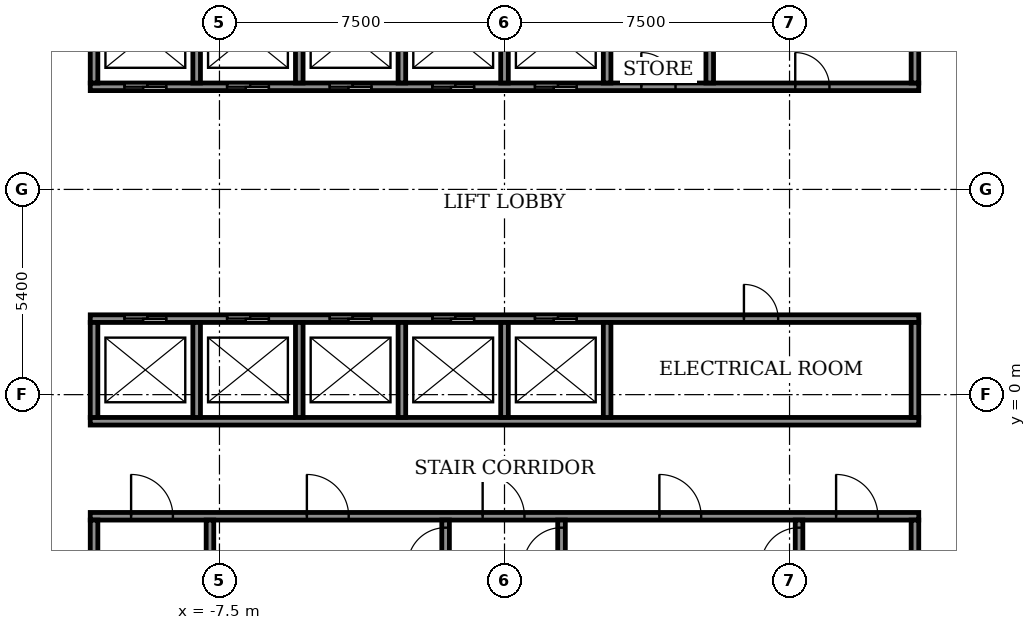
"""IFC4 building model, lengths in metres.
Left out: names, types, materials, properties, quantities, classifications, styles, units other than length and angle.
Written with IfcOpenShell. Run it as: python <this file> out.ifc"""

import sys

from ifc_helpers import new_model, si_unit, direction, frame, frame_2d, origin, place, context, subcontext, project, spatial, rectangle, extrude, element, fill, save


model = new_model("IFC4")
c1 = context("Model", 3, precision=1e-05, world=origin(), true_north=direction((0.0, 1.0)))
c2 = subcontext(c1, "Body", "Model", "MODEL_VIEW")
j1 = project(units=[si_unit("LENGTHUNIT", "METRE"), si_unit("PLANEANGLEUNIT", "RADIAN")], contexts=[c1])
p1 = place(None, origin())
s1 = spatial("IfcSite", under=j1, at=p1, CompositionType="ELEMENT")
p2 = place(p1, origin())
s2 = spatial("IfcBuilding", under=s1, at=p2, CompositionType="ELEMENT")
p3 = place(p2, origin())
s3 = spatial("IfcBuildingStorey", under=s2, at=p3, CompositionType="ELEMENT", Elevation=0.0)
p4 = place(p3, frame((-10.9, -3.2, 0.0), z_axis=(0.0, 0.0, 1.0), x_axis=(1.0, 0.0, 0.0)))
e1 = element("IfcWall", 1, at=p4, inside=s3, PredefinedType="SHEAR", context=c2, shape_type="SweptSolid", body=[
    extrude(rectangle(XDim=21.8, YDim=0.2, at=frame_2d((10.9, 0.0))), origin(), (0.0, 0.0, 1.0), 5.45),
])
p5 = place(p4, frame((1.075, 0.0, 0.0)))
e2 = element("IfcOpeningElement", 2, at=p5, cuts=e1, PredefinedType="OPENING", context=c2, shape_type="SweptSolid", body=[
    extrude(rectangle(XDim=1.1, YDim=2.1, at=frame_2d((0.55, 1.05))), frame((0.0, 0.11, 0.0), z_axis=(0.0, -1.0, 0.0), x_axis=(1.0, 0.0, 0.0)), (0.0, 0.0, 1.0), 0.22),
])
p6 = place(p4, frame((10.325, 0.0, 0.0)))
e3 = element("IfcOpeningElement", 3, at=p6, cuts=e1, PredefinedType="OPENING", context=c2, shape_type="SweptSolid", body=[
    extrude(rectangle(XDim=1.1, YDim=2.1, at=frame_2d((0.55, 1.05))), frame((0.0, 0.11, 0.0), z_axis=(0.0, -1.0, 0.0), x_axis=(1.0, 0.0, 0.0)), (0.0, 0.0, 1.0), 0.22),
])
p7 = place(p4, frame((19.625, 0.0, 0.0)))
e4 = element("IfcOpeningElement", 4, at=p7, cuts=e1, PredefinedType="OPENING", context=c2, shape_type="SweptSolid", body=[
    extrude(rectangle(XDim=1.1, YDim=2.1, at=frame_2d((0.55, 1.05))), frame((0.0, 0.11, 0.0), z_axis=(0.0, -1.0, 0.0), x_axis=(1.0, 0.0, 0.0)), (0.0, 0.0, 1.0), 0.22),
])
p8 = place(p4, frame((5.7, 0.0, 0.0)))
e5 = element("IfcOpeningElement", 5, at=p8, cuts=e1, PredefinedType="OPENING", context=c2, shape_type="SweptSolid", body=[
    extrude(rectangle(XDim=1.1, YDim=2.1, at=frame_2d((0.55, 1.05))), frame((0.0, 0.11, 0.0), z_axis=(0.0, -1.0, 0.0), x_axis=(1.0, 0.0, 0.0)), (0.0, 0.0, 1.0), 0.22),
])
p9 = place(p4, frame((14.975, 0.0, 0.0)))
e6 = element("IfcOpeningElement", 6, at=p9, cuts=e1, PredefinedType="OPENING", context=c2, shape_type="SweptSolid", body=[
    extrude(rectangle(XDim=1.1, YDim=2.1, at=frame_2d((0.55, 1.05))), frame((0.0, 0.11, 0.0), z_axis=(0.0, -1.0, 0.0), x_axis=(1.0, 0.0, 0.0)), (0.0, 0.0, 1.0), 0.22),
])
p10 = place(p3, frame((-10.9, -0.7, 0.0), z_axis=(0.0, 0.0, 1.0), x_axis=(1.0, 0.0, 0.0)))
e7 = element("IfcWall", 7, at=p10, inside=s3, PredefinedType="SHEAR", context=c2, shape_type="SweptSolid", body=[
    extrude(rectangle(XDim=21.8, YDim=0.2, at=frame_2d((10.9, 0.0))), origin(), (0.0, 0.0, 1.0), 5.45),
])
p11 = place(p3, frame((-10.9, 2.0, 0.0), z_axis=(0.0, 0.0, 1.0), x_axis=(1.0, 0.0, 0.0)))
e8 = element("IfcWall", 8, at=p11, inside=s3, PredefinedType="SHEAR", context=c2, shape_type="SweptSolid", body=[
    extrude(rectangle(XDim=21.8, YDim=0.2, at=frame_2d((10.9, 0.0))), origin(), (0.0, 0.0, 1.0), 5.45),
])
p12 = place(p11, frame((0.9, 0.0, 0.0)))
e9 = element("IfcOpeningElement", 9, at=p12, cuts=e8, PredefinedType="OPENING", context=c2, shape_type="SweptSolid", body=[
    extrude(rectangle(XDim=1.1, YDim=2.1, at=frame_2d((0.55, 1.05))), frame((0.0, 0.11, 0.0), z_axis=(0.0, -1.0, 0.0), x_axis=(1.0, 0.0, 0.0)), (0.0, 0.0, 1.0), 0.22),
])
p13 = place(p11, frame((3.6, 0.0, 0.0)))
e10 = element("IfcOpeningElement", 10, at=p13, cuts=e8, PredefinedType="OPENING", context=c2, shape_type="SweptSolid", body=[
    extrude(rectangle(XDim=1.1, YDim=2.1, at=frame_2d((0.55, 1.05))), frame((0.0, 0.11, 0.0), z_axis=(0.0, -1.0, 0.0), x_axis=(1.0, 0.0, 0.0)), (0.0, 0.0, 1.0), 0.22),
])
p14 = place(p11, frame((6.3, 0.0, 0.0)))
e11 = element("IfcOpeningElement", 11, at=p14, cuts=e8, PredefinedType="OPENING", context=c2, shape_type="SweptSolid", body=[
    extrude(rectangle(XDim=1.1, YDim=2.1, at=frame_2d((0.55, 1.05))), frame((0.0, 0.11, 0.0), z_axis=(0.0, -1.0, 0.0), x_axis=(1.0, 0.0, 0.0)), (0.0, 0.0, 1.0), 0.22),
])
p15 = place(p11, frame((9.0, 0.0, 0.0)))
e12 = element("IfcOpeningElement", 12, at=p15, cuts=e8, PredefinedType="OPENING", context=c2, shape_type="SweptSolid", body=[
    extrude(rectangle(XDim=1.1, YDim=2.1, at=frame_2d((0.55, 1.05))), frame((0.0, 0.11, 0.0), z_axis=(0.0, -1.0, 0.0), x_axis=(1.0, 0.0, 0.0)), (0.0, 0.0, 1.0), 0.22),
])
p16 = place(p11, frame((11.7, 0.0, 0.0)))
e13 = element("IfcOpeningElement", 13, at=p16, cuts=e8, PredefinedType="OPENING", context=c2, shape_type="SweptSolid", body=[
    extrude(rectangle(XDim=1.1, YDim=2.1, at=frame_2d((0.55, 1.05))), frame((0.0, 0.11, 0.0), z_axis=(0.0, -1.0, 0.0), x_axis=(1.0, 0.0, 0.0)), (0.0, 0.0, 1.0), 0.22),
])
p17 = place(p11, frame((17.2, 0.0, 0.0)))
e14 = element("IfcOpeningElement", 14, at=p17, cuts=e8, PredefinedType="OPENING", context=c2, shape_type="SweptSolid", body=[
    extrude(rectangle(XDim=0.9, YDim=2.1, at=frame_2d((0.45, 1.05))), frame((0.0, 0.11, 0.0), z_axis=(0.0, -1.0, 0.0), x_axis=(1.0, 0.0, 0.0)), (0.0, 0.0, 1.0), 0.22),
])
p18 = place(p3, frame((-10.9, 8.1, 0.0), z_axis=(0.0, 0.0, 1.0), x_axis=(1.0, 0.0, 0.0)))
e15 = element("IfcWall", 15, at=p18, inside=s3, PredefinedType="SHEAR", context=c2, shape_type="SweptSolid", body=[
    extrude(rectangle(XDim=21.8, YDim=0.2, at=frame_2d((10.9, 0.0))), origin(), (0.0, 0.0, 1.0), 5.45),
])
p19 = place(p18, frame((0.9, 0.0, 0.0)))
e16 = element("IfcOpeningElement", 16, at=p19, cuts=e15, PredefinedType="OPENING", context=c2, shape_type="SweptSolid", body=[
    extrude(rectangle(XDim=1.1, YDim=2.1, at=frame_2d((0.55, 1.05))), frame((0.0, 0.11, 0.0), z_axis=(0.0, -1.0, 0.0), x_axis=(1.0, 0.0, 0.0)), (0.0, 0.0, 1.0), 0.22),
])
p20 = place(p18, frame((3.6, 0.0, 0.0)))
e17 = element("IfcOpeningElement", 17, at=p20, cuts=e15, PredefinedType="OPENING", context=c2, shape_type="SweptSolid", body=[
    extrude(rectangle(XDim=1.1, YDim=2.1, at=frame_2d((0.55, 1.05))), frame((0.0, 0.11, 0.0), z_axis=(0.0, -1.0, 0.0), x_axis=(1.0, 0.0, 0.0)), (0.0, 0.0, 1.0), 0.22),
])
p21 = place(p18, frame((6.3, 0.0, 0.0)))
e18 = element("IfcOpeningElement", 18, at=p21, cuts=e15, PredefinedType="OPENING", context=c2, shape_type="SweptSolid", body=[
    extrude(rectangle(XDim=1.1, YDim=2.1, at=frame_2d((0.55, 1.05))), frame((0.0, 0.11, 0.0), z_axis=(0.0, -1.0, 0.0), x_axis=(1.0, 0.0, 0.0)), (0.0, 0.0, 1.0), 0.22),
])
p22 = place(p18, frame((9.0, 0.0, 0.0)))
e19 = element("IfcOpeningElement", 19, at=p22, cuts=e15, PredefinedType="OPENING", context=c2, shape_type="SweptSolid", body=[
    extrude(rectangle(XDim=1.1, YDim=2.1, at=frame_2d((0.55, 1.05))), frame((0.0, 0.11, 0.0), z_axis=(0.0, -1.0, 0.0), x_axis=(1.0, 0.0, 0.0)), (0.0, 0.0, 1.0), 0.22),
])
p23 = place(p18, frame((11.7, 0.0, 0.0)))
e20 = element("IfcOpeningElement", 20, at=p23, cuts=e15, PredefinedType="OPENING", context=c2, shape_type="SweptSolid", body=[
    extrude(rectangle(XDim=1.1, YDim=2.1, at=frame_2d((0.55, 1.05))), frame((0.0, 0.11, 0.0), z_axis=(0.0, -1.0, 0.0), x_axis=(1.0, 0.0, 0.0)), (0.0, 0.0, 1.0), 0.22),
])
p24 = place(p18, frame((14.5, 0.0, 0.0)))
e21 = element("IfcOpeningElement", 21, at=p24, cuts=e15, PredefinedType="OPENING", context=c2, shape_type="SweptSolid", body=[
    extrude(rectangle(XDim=0.9, YDim=2.1, at=frame_2d((0.45, 1.05))), frame((0.0, 0.11, 0.0), z_axis=(0.0, -1.0, 0.0), x_axis=(1.0, 0.0, 0.0)), (0.0, 0.0, 1.0), 0.22),
])
p25 = place(p18, frame((18.55, 0.0, 0.0)))
e22 = element("IfcOpeningElement", 22, at=p25, cuts=e15, PredefinedType="OPENING", context=c2, shape_type="SweptSolid", body=[
    extrude(rectangle(XDim=0.9, YDim=2.1, at=frame_2d((0.45, 1.05))), frame((0.0, 0.11, 0.0), z_axis=(0.0, -1.0, 0.0), x_axis=(1.0, 0.0, 0.0)), (0.0, 0.0, 1.0), 0.22),
])
for number, where, z_axis, x_axis in (
    (23, (-10.8, -10.8, 0.0), (0.0, 0.0, 1.0), (0.0, 1.0, 0.0)),
    (24, (-7.75, -10.8, 0.0), (0.0, 0.0, 1.0), (0.0, 1.0, 0.0)),
):
    element("IfcWall", number, at=place(p3, frame(where, z_axis=z_axis, x_axis=x_axis)), inside=s3, PredefinedType="SHEAR", context=c2, shape_type="SweptSolid", body=[
        extrude(rectangle(XDim=7.5, YDim=0.2, at=frame_2d((3.75, 0.0))), origin(), (0.0, 0.0, 1.0), 5.45),
    ])
p26 = place(p3, frame((-1.55, -10.8, 0.0), z_axis=(0.0, 0.0, 1.0), x_axis=(0.0, 1.0, 0.0)))
e25 = element("IfcWall", 25, at=p26, inside=s3, PredefinedType="SHEAR", context=c2, shape_type="SweptSolid", body=[
    extrude(rectangle(XDim=7.5, YDim=0.2, at=frame_2d((3.75, 0.0))), origin(), (0.0, 0.0, 1.0), 5.45),
])
p27 = place(p26, frame((6.3, 0.0, 0.0)))
e26 = element("IfcOpeningElement", 26, at=p27, cuts=e25, PredefinedType="OPENING", context=c2, shape_type="SweptSolid", body=[
    extrude(rectangle(XDim=1.0, YDim=2.1, at=frame_2d((0.5, 1.05))), frame((0.0, 0.11, 0.0), z_axis=(0.0, -1.0, 0.0), x_axis=(1.0, 0.0, 0.0)), (0.0, 0.0, 1.0), 0.22),
])
p28 = place(p3, frame((1.5, -10.8, 0.0), z_axis=(0.0, 0.0, 1.0), x_axis=(0.0, 1.0, 0.0)))
e27 = element("IfcWall", 27, at=p28, inside=s3, PredefinedType="SHEAR", context=c2, shape_type="SweptSolid", body=[
    extrude(rectangle(XDim=7.5, YDim=0.2, at=frame_2d((3.75, 0.0))), origin(), (0.0, 0.0, 1.0), 5.45),
])
p29 = place(p28, frame((6.3, 0.0, 0.0)))
e28 = element("IfcOpeningElement", 28, at=p29, cuts=e27, PredefinedType="OPENING", context=c2, shape_type="SweptSolid", body=[
    extrude(rectangle(XDim=1.0, YDim=2.1, at=frame_2d((0.5, 1.05))), frame((0.0, 0.11, 0.0), z_axis=(0.0, -1.0, 0.0), x_axis=(1.0, 0.0, 0.0)), (0.0, 0.0, 1.0), 0.22),
])
p30 = place(p3, frame((7.75, -10.8, 0.0), z_axis=(0.0, 0.0, 1.0), x_axis=(0.0, 1.0, 0.0)))
e29 = element("IfcWall", 29, at=p30, inside=s3, PredefinedType="SHEAR", context=c2, shape_type="SweptSolid", body=[
    extrude(rectangle(XDim=7.5, YDim=0.2, at=frame_2d((3.75, 0.0))), origin(), (0.0, 0.0, 1.0), 5.45),
])
p31 = place(p30, frame((6.3, 0.0, 0.0)))
e30 = element("IfcOpeningElement", 30, at=p31, cuts=e29, PredefinedType="OPENING", context=c2, shape_type="SweptSolid", body=[
    extrude(rectangle(XDim=1.0, YDim=2.1, at=frame_2d((0.5, 1.05))), frame((0.0, 0.11, 0.0), z_axis=(0.0, -1.0, 0.0), x_axis=(1.0, 0.0, 0.0)), (0.0, 0.0, 1.0), 0.22),
])
p32 = place(p3, frame((10.8, -10.8, 0.0), z_axis=(0.0, 0.0, 1.0), x_axis=(0.0, 1.0, 0.0)))
e31 = element("IfcWall", 31, at=p32, inside=s3, PredefinedType="SHEAR", context=c2, shape_type="SweptSolid", body=[
    extrude(rectangle(XDim=7.5, YDim=0.2, at=frame_2d((3.75, 0.0))), origin(), (0.0, 0.0, 1.0), 5.45),
])
for number, where, z_axis, x_axis in (
    (32, (-10.8, -0.6, 0.0), (0.0, 0.0, 1.0), (0.0, 1.0, 0.0)),
    (33, (-8.1, -0.6, 0.0), (0.0, 0.0, 1.0), (0.0, 1.0, 0.0)),
    (34, (-5.4, -0.6, 0.0), (0.0, 0.0, 1.0), (0.0, 1.0, 0.0)),
    (35, (-2.7, -0.6, 0.0), (0.0, 0.0, 1.0), (0.0, 1.0, 0.0)),
    (36, (0.0, -0.6, 0.0), (0.0, 0.0, 1.0), (0.0, 1.0, 0.0)),
    (37, (2.7, -0.6, 0.0), (0.0, 0.0, 1.0), (0.0, 1.0, 0.0)),
):
    element("IfcWall", number, at=place(p3, frame(where, z_axis=z_axis, x_axis=x_axis)), inside=s3, PredefinedType="SHEAR", context=c2, shape_type="SweptSolid", body=[
        extrude(rectangle(XDim=2.5, YDim=0.2, at=frame_2d((1.25, 0.0))), origin(), (0.0, 0.0, 1.0), 5.45),
    ])
p33 = place(p3, frame((10.8, -0.6, 0.0), z_axis=(0.0, 0.0, 1.0), x_axis=(0.0, 1.0, 0.0)))
e38 = element("IfcWall", 38, at=p33, inside=s3, PredefinedType="STANDARD", context=c2, shape_type="SweptSolid", body=[
    extrude(rectangle(XDim=2.5, YDim=0.2, at=frame_2d((1.25, 0.0))), origin(), (0.0, 0.0, 1.0), 5.45),
])
for number, where, z_axis, x_axis in (
    (39, (-10.8, 8.2, 0.0), (0.0, 0.0, 1.0), (0.0, 1.0, 0.0)),
    (40, (-8.1, 8.2, 0.0), (0.0, 0.0, 1.0), (0.0, 1.0, 0.0)),
    (41, (-5.4, 8.2, 0.0), (0.0, 0.0, 1.0), (0.0, 1.0, 0.0)),
    (42, (-2.7, 8.2, 0.0), (0.0, 0.0, 1.0), (0.0, 1.0, 0.0)),
    (43, (0.0, 8.2, 0.0), (0.0, 0.0, 1.0), (0.0, 1.0, 0.0)),
    (44, (2.7, 8.2, 0.0), (0.0, 0.0, 1.0), (0.0, 1.0, 0.0)),
):
    element("IfcWall", number, at=place(p3, frame(where, z_axis=z_axis, x_axis=x_axis)), inside=s3, PredefinedType="SHEAR", context=c2, shape_type="SweptSolid", body=[
        extrude(rectangle(XDim=2.6, YDim=0.2, at=frame_2d((1.3, 0.0))), origin(), (0.0, 0.0, 1.0), 5.45),
    ])
for number, where, z_axis, x_axis in (
    (45, (5.4, 8.2, 0.0), (0.0, 0.0, 1.0), (0.0, 1.0, 0.0)),
    (46, (10.8, 8.2, 0.0), (0.0, 0.0, 1.0), (0.0, 1.0, 0.0)),
):
    element("IfcWall", number, at=place(p3, frame(where, z_axis=z_axis, x_axis=x_axis)), inside=s3, PredefinedType="STANDARD", context=c2, shape_type="SweptSolid", body=[
        extrude(rectangle(XDim=2.6, YDim=0.2, at=frame_2d((1.3, 0.0))), origin(), (0.0, 0.0, 1.0), 5.45),
    ])
p34 = place(p12, origin())
e47 = element("IfcDoor", 47, at=p34, inside=s3, OperationType="SLIDING_TO_LEFT", PredefinedType="DOOR", context=c2, shape_type="SweptSolid", body=[
    extrude(rectangle(XDim=1.1, YDim=2.1, at=frame_2d((0.55, 1.05))), frame((0.0, 0.025, 0.0), z_axis=(0.0, -1.0, 0.0), x_axis=(1.0, 0.0, 0.0)), (0.0, 0.0, 1.0), 0.05),
])
fill(e9, e47)
p35 = place(p13, origin())
e48 = element("IfcDoor", 48, at=p35, inside=s3, OperationType="SLIDING_TO_LEFT", PredefinedType="DOOR", context=c2, shape_type="SweptSolid", body=[
    extrude(rectangle(XDim=1.1, YDim=2.1, at=frame_2d((0.55, 1.05))), frame((0.0, 0.025, 0.0), z_axis=(0.0, -1.0, 0.0), x_axis=(1.0, 0.0, 0.0)), (0.0, 0.0, 1.0), 0.05),
])
fill(e10, e48)
p36 = place(p14, origin())
e49 = element("IfcDoor", 49, at=p36, inside=s3, OperationType="SLIDING_TO_LEFT", PredefinedType="DOOR", context=c2, shape_type="SweptSolid", body=[
    extrude(rectangle(XDim=1.1, YDim=2.1, at=frame_2d((0.55, 1.05))), frame((0.0, 0.025, 0.0), z_axis=(0.0, -1.0, 0.0), x_axis=(1.0, 0.0, 0.0)), (0.0, 0.0, 1.0), 0.05),
])
fill(e11, e49)
p37 = place(p15, origin())
e50 = element("IfcDoor", 50, at=p37, inside=s3, OperationType="SLIDING_TO_LEFT", PredefinedType="DOOR", context=c2, shape_type="SweptSolid", body=[
    extrude(rectangle(XDim=1.1, YDim=2.1, at=frame_2d((0.55, 1.05))), frame((0.0, 0.025, 0.0), z_axis=(0.0, -1.0, 0.0), x_axis=(1.0, 0.0, 0.0)), (0.0, 0.0, 1.0), 0.05),
])
fill(e12, e50)
p38 = place(p16, origin())
e51 = element("IfcDoor", 51, at=p38, inside=s3, OperationType="SLIDING_TO_LEFT", PredefinedType="DOOR", context=c2, shape_type="SweptSolid", body=[
    extrude(rectangle(XDim=1.1, YDim=2.1, at=frame_2d((0.55, 1.05))), frame((0.0, 0.025, 0.0), z_axis=(0.0, -1.0, 0.0), x_axis=(1.0, 0.0, 0.0)), (0.0, 0.0, 1.0), 0.05),
])
fill(e13, e51)
p39 = place(p19, origin())
e52 = element("IfcDoor", 52, at=p39, inside=s3, OperationType="SLIDING_TO_LEFT", PredefinedType="DOOR", context=c2, shape_type="SweptSolid", body=[
    extrude(rectangle(XDim=1.1, YDim=2.1, at=frame_2d((0.55, 1.05))), frame((0.0, 0.025, 0.0), z_axis=(0.0, -1.0, 0.0), x_axis=(1.0, 0.0, 0.0)), (0.0, 0.0, 1.0), 0.05),
])
fill(e16, e52)
p40 = place(p20, origin())
e53 = element("IfcDoor", 53, at=p40, inside=s3, OperationType="SLIDING_TO_LEFT", PredefinedType="DOOR", context=c2, shape_type="SweptSolid", body=[
    extrude(rectangle(XDim=1.1, YDim=2.1, at=frame_2d((0.55, 1.05))), frame((0.0, 0.025, 0.0), z_axis=(0.0, -1.0, 0.0), x_axis=(1.0, 0.0, 0.0)), (0.0, 0.0, 1.0), 0.05),
])
fill(e17, e53)
p41 = place(p21, origin())
e54 = element("IfcDoor", 54, at=p41, inside=s3, OperationType="SLIDING_TO_LEFT", PredefinedType="DOOR", context=c2, shape_type="SweptSolid", body=[
    extrude(rectangle(XDim=1.1, YDim=2.1, at=frame_2d((0.55, 1.05))), frame((0.0, 0.025, 0.0), z_axis=(0.0, -1.0, 0.0), x_axis=(1.0, 0.0, 0.0)), (0.0, 0.0, 1.0), 0.05),
])
fill(e18, e54)
p42 = place(p22, origin())
e55 = element("IfcDoor", 55, at=p42, inside=s3, OperationType="SLIDING_TO_LEFT", PredefinedType="DOOR", context=c2, shape_type="SweptSolid", body=[
    extrude(rectangle(XDim=1.1, YDim=2.1, at=frame_2d((0.55, 1.05))), frame((0.0, 0.025, 0.0), z_axis=(0.0, -1.0, 0.0), x_axis=(1.0, 0.0, 0.0)), (0.0, 0.0, 1.0), 0.05),
])
fill(e19, e55)
p43 = place(p23, origin())
e56 = element("IfcDoor", 56, at=p43, inside=s3, OperationType="SLIDING_TO_LEFT", PredefinedType="DOOR", context=c2, shape_type="SweptSolid", body=[
    extrude(rectangle(XDim=1.1, YDim=2.1, at=frame_2d((0.55, 1.05))), frame((0.0, 0.025, 0.0), z_axis=(0.0, -1.0, 0.0), x_axis=(1.0, 0.0, 0.0)), (0.0, 0.0, 1.0), 0.05),
])
fill(e20, e56)
p44 = place(p17, origin())
e57 = element("IfcDoor", 57, at=p44, inside=s3, OperationType="SINGLE_SWING_LEFT", PredefinedType="DOOR", context=c2, shape_type="SweptSolid", body=[
    extrude(rectangle(XDim=0.9, YDim=2.1, at=frame_2d((0.45, 1.05))), frame((0.0, 0.025, 0.0), z_axis=(0.0, -1.0, 0.0), x_axis=(1.0, 0.0, 0.0)), (0.0, 0.0, 1.0), 0.05),
])
fill(e14, e57)
p45 = place(p24, origin())
e58 = element("IfcDoor", 58, at=p45, inside=s3, OperationType="SINGLE_SWING_RIGHT", PredefinedType="DOOR", context=c2, shape_type="SweptSolid", body=[
    extrude(rectangle(XDim=0.9, YDim=2.1, at=frame_2d((0.45, 1.05))), frame((0.0, 0.025, 0.0), z_axis=(0.0, -1.0, 0.0), x_axis=(1.0, 0.0, 0.0)), (0.0, 0.0, 1.0), 0.05),
])
fill(e21, e58)
p46 = place(p25, origin())
e59 = element("IfcDoor", 59, at=p46, inside=s3, OperationType="SINGLE_SWING_LEFT", PredefinedType="DOOR", context=c2, shape_type="SweptSolid", body=[
    extrude(rectangle(XDim=0.9, YDim=2.1, at=frame_2d((0.45, 1.05))), frame((0.0, 0.025, 0.0), z_axis=(0.0, -1.0, 0.0), x_axis=(1.0, 0.0, 0.0)), (0.0, 0.0, 1.0), 0.05),
])
fill(e22, e59)
p47 = place(p5, origin())
e60 = element("IfcDoor", 60, at=p47, inside=s3, OperationType="SINGLE_SWING_RIGHT", PredefinedType="DOOR", context=c2, shape_type="SweptSolid", body=[
    extrude(rectangle(XDim=1.1, YDim=2.1, at=frame_2d((0.55, 1.05))), frame((0.0, 0.025, 0.0), z_axis=(0.0, -1.0, 0.0), x_axis=(1.0, 0.0, 0.0)), (0.0, 0.0, 1.0), 0.05),
])
fill(e2, e60)
p48 = place(p6, origin())
e61 = element("IfcDoor", 61, at=p48, inside=s3, OperationType="SINGLE_SWING_RIGHT", PredefinedType="DOOR", context=c2, shape_type="SweptSolid", body=[
    extrude(rectangle(XDim=1.1, YDim=2.1, at=frame_2d((0.55, 1.05))), frame((0.0, 0.025, 0.0), z_axis=(0.0, -1.0, 0.0), x_axis=(1.0, 0.0, 0.0)), (0.0, 0.0, 1.0), 0.05),
])
fill(e3, e61)
p49 = place(p7, origin())
e62 = element("IfcDoor", 62, at=p49, inside=s3, OperationType="SINGLE_SWING_RIGHT", PredefinedType="DOOR", context=c2, shape_type="SweptSolid", body=[
    extrude(rectangle(XDim=1.1, YDim=2.1, at=frame_2d((0.55, 1.05))), frame((0.0, 0.025, 0.0), z_axis=(0.0, -1.0, 0.0), x_axis=(1.0, 0.0, 0.0)), (0.0, 0.0, 1.0), 0.05),
])
fill(e4, e62)
p50 = place(p8, origin())
e63 = element("IfcDoor", 63, at=p50, inside=s3, OperationType="SINGLE_SWING_LEFT", PredefinedType="DOOR", context=c2, shape_type="SweptSolid", body=[
    extrude(rectangle(XDim=1.1, YDim=2.1, at=frame_2d((0.55, 1.05))), frame((0.0, 0.025, 0.0), z_axis=(0.0, -1.0, 0.0), x_axis=(1.0, 0.0, 0.0)), (0.0, 0.0, 1.0), 0.05),
])
fill(e5, e63)
p51 = place(p9, origin())
e64 = element("IfcDoor", 64, at=p51, inside=s3, OperationType="SINGLE_SWING_LEFT", PredefinedType="DOOR", context=c2, shape_type="SweptSolid", body=[
    extrude(rectangle(XDim=1.1, YDim=2.1, at=frame_2d((0.55, 1.05))), frame((0.0, 0.025, 0.0), z_axis=(0.0, -1.0, 0.0), x_axis=(1.0, 0.0, 0.0)), (0.0, 0.0, 1.0), 0.05),
])
fill(e6, e64)
p52 = place(p27, origin())
e65 = element("IfcDoor", 65, at=p52, inside=s3, OperationType="SINGLE_SWING_RIGHT", PredefinedType="DOOR", context=c2, shape_type="SweptSolid", body=[
    extrude(rectangle(XDim=1.0, YDim=2.1, at=frame_2d((0.5, 1.05))), frame((0.0, 0.025, 0.0), z_axis=(0.0, -1.0, 0.0), x_axis=(1.0, 0.0, 0.0)), (0.0, 0.0, 1.0), 0.05),
])
fill(e26, e65)
p53 = place(p29, origin())
e66 = element("IfcDoor", 66, at=p53, inside=s3, OperationType="SINGLE_SWING_RIGHT", PredefinedType="DOOR", context=c2, shape_type="SweptSolid", body=[
    extrude(rectangle(XDim=1.0, YDim=2.1, at=frame_2d((0.5, 1.05))), frame((0.0, 0.025, 0.0), z_axis=(0.0, -1.0, 0.0), x_axis=(1.0, 0.0, 0.0)), (0.0, 0.0, 1.0), 0.05),
])
fill(e28, e66)
p54 = place(p31, origin())
e67 = element("IfcDoor", 67, at=p54, inside=s3, OperationType="SINGLE_SWING_RIGHT", PredefinedType="DOOR", context=c2, shape_type="SweptSolid", body=[
    extrude(rectangle(XDim=1.0, YDim=2.1, at=frame_2d((0.5, 1.05))), frame((0.0, 0.025, 0.0), z_axis=(0.0, -1.0, 0.0), x_axis=(1.0, 0.0, 0.0)), (0.0, 0.0, 1.0), 0.05),
])
fill(e30, e67)
save(model, sys.argv[1])
